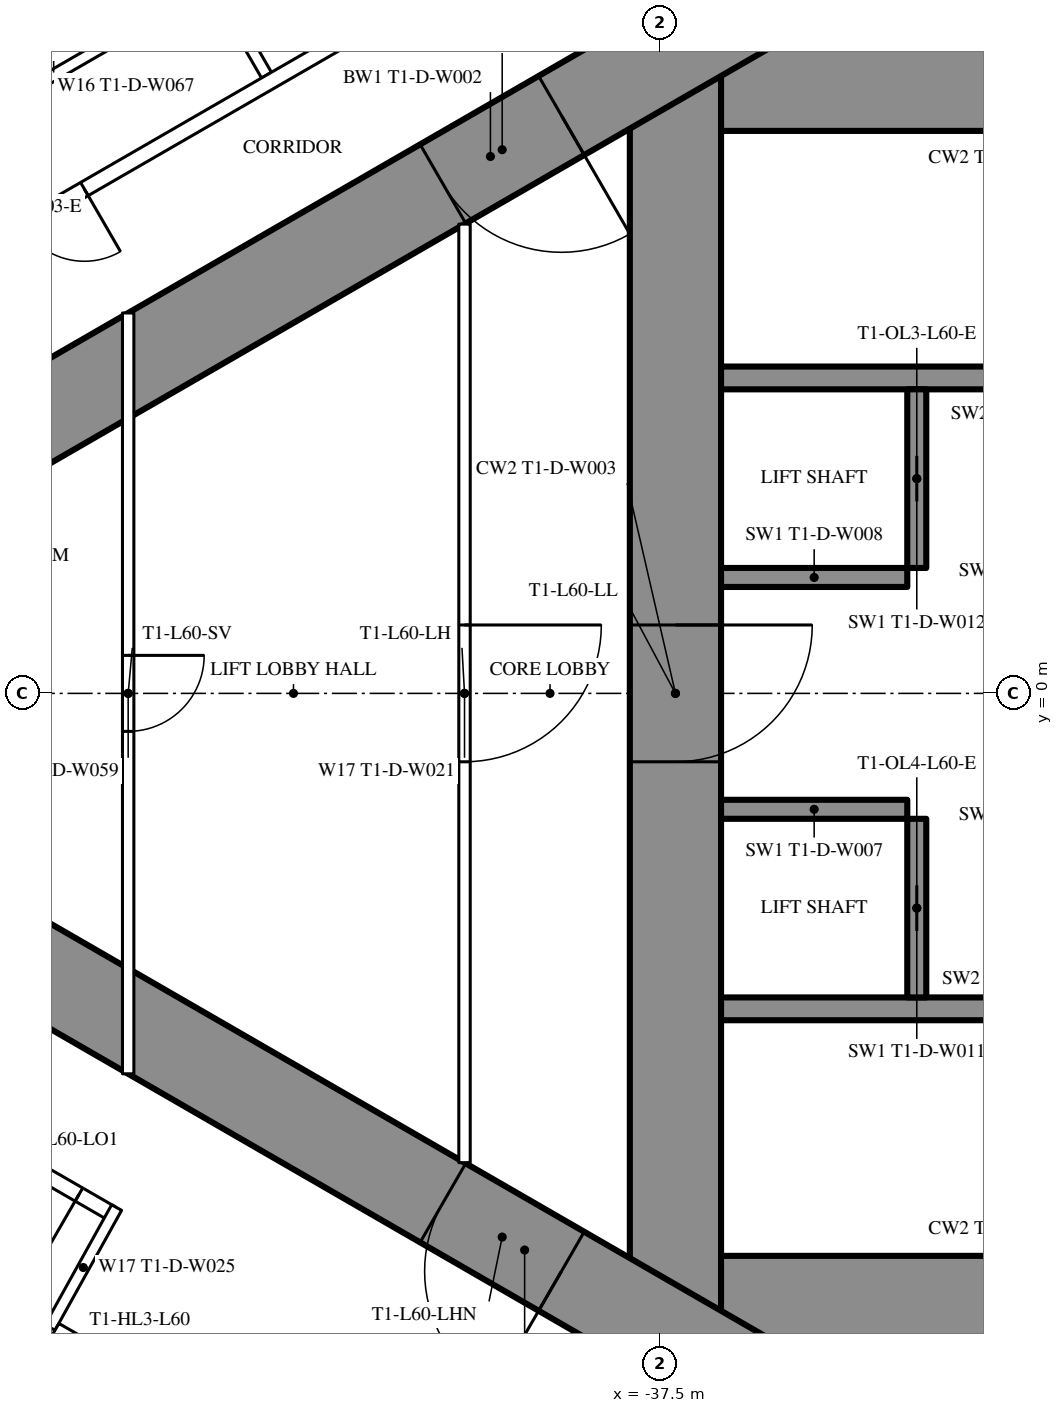
"""IFC4 building model, lengths in metres.
Left out: names, types, materials, properties, quantities, classifications, styles, units other than length and angle.
Written with IfcOpenShell. Run it as: python <this file> out.ifc"""

import sys

from ifc_helpers import new_model, si_unit, direction, frame, frame_2d, origin, place, context, subcontext, project, spatial, rectangle, extrude, element, fill, save


model = new_model("IFC4")
c1 = context("Model", 3, precision=1e-05, world=origin(), true_north=direction((0.0, 1.0)))
c2 = subcontext(c1, "Body", "Model", "MODEL_VIEW")
j1 = project(units=[si_unit("LENGTHUNIT", "METRE"), si_unit("PLANEANGLEUNIT", "RADIAN")], contexts=[c1])
p1 = place(None, origin())
s1 = spatial("IfcSite", under=j1, at=p1, CompositionType="ELEMENT")
p2 = place(p1, origin())
s2 = spatial("IfcBuilding", under=s1, at=p2, CompositionType="ELEMENT")
p3 = place(p2, frame((0.0, 0.0, 226.1)))
s3 = spatial("IfcBuildingStorey", under=s2, at=p3, CompositionType="ELEMENT", Elevation=226.1)
p4 = place(p3, frame((-37.3, 8.6, 0.0), z_axis=(0.0, 0.0, 1.0), x_axis=(0.0, -1.0, 0.0)))
e1 = element("IfcWall", 1, at=p4, inside=s3, PredefinedType="SHEAR", context=c2, shape_type="SweptSolid", body=[
    extrude(rectangle(XDim=17.2, YDim=1.2, at=frame_2d((8.6, 0.0))), origin(), (0.0, 0.0, 1.0), 3.6),
])
p5 = place(p4, frame((7.7, 0.0, 0.0)))
e2 = element("IfcOpeningElement", 2, at=p5, cuts=e1, PredefinedType="OPENING", context=c2, shape_type="SweptSolid", body=[
    extrude(rectangle(XDim=1.8, YDim=2.2, at=frame_2d((0.9, 1.1))), frame((0.0, 0.61, 0.0), z_axis=(0.0, -1.0, 0.0), x_axis=(1.0, 0.0, 0.0)), (0.0, 0.0, 1.0), 1.22),
])
p6 = place(p3, frame((-28.3, 8.0, 0.0), z_axis=(0.0, 0.0, 1.0), x_axis=(-1.0, 0.0, 0.0)))
e3 = element("IfcWall", 3, at=p6, inside=s3, PredefinedType="SHEAR", context=c2, shape_type="SweptSolid", body=[
    extrude(rectangle(XDim=8.4, YDim=1.2, at=frame_2d((4.2, 0.0))), origin(), (0.0, 0.0, 1.0), 3.6),
])
p7 = place(p6, frame((0.25, 0.0, 0.0)))
e4 = element("IfcOpeningElement", 4, at=p7, cuts=e3, PredefinedType="OPENING", context=c2, shape_type="SweptSolid", body=[
    extrude(rectangle(XDim=1.0, YDim=2.2, at=frame_2d((0.5, 1.1))), frame((0.0, 0.61, 0.0), z_axis=(0.0, -1.0, 0.0), x_axis=(1.0, 0.0, 0.0)), (0.0, 0.0, 1.0), 1.22),
])
p8 = place(p3, frame((-28.3, -8.0, 0.0), z_axis=(0.0, 0.0, 1.0), x_axis=(-1.0, 0.0, 0.0)))
e5 = element("IfcWall", 5, at=p8, inside=s3, PredefinedType="SHEAR", context=c2, shape_type="SweptSolid", body=[
    extrude(rectangle(XDim=8.4, YDim=1.2, at=frame_2d((4.2, 0.0))), origin(), (0.0, 0.0, 1.0), 3.6),
])
p9 = place(p8, frame((0.25, 0.0, 0.0)))
e6 = element("IfcOpeningElement", 6, at=p9, cuts=e5, PredefinedType="OPENING", context=c2, shape_type="SweptSolid", body=[
    extrude(rectangle(XDim=1.0, YDim=2.2, at=frame_2d((0.5, 1.1))), frame((0.0, 0.61, 0.0), z_axis=(0.0, -1.0, 0.0), x_axis=(1.0, 0.0, 0.0)), (0.0, 0.0, 1.0), 1.22),
])
for number, where, z_axis, x_axis in (
    (7, (-28.3, 4.15, 0.0), (0.0, 0.0, 1.0), (-1.0, 0.0, 0.0)),
    (8, (-28.3, -4.15, 0.0), (0.0, 0.0, 1.0), (-1.0, 0.0, 0.0)),
):
    element("IfcWall", number, at=place(p3, frame(where, z_axis=z_axis, x_axis=x_axis)), inside=s3, PredefinedType="SHEAR", context=c2, shape_type="SweptSolid", body=[
        extrude(rectangle(XDim=8.4, YDim=0.3, at=frame_2d((4.2, 0.0))), origin(), (0.0, 0.0, 1.0), 3.6),
    ])
p10 = place(p3, frame((-34.125, 4.0, 0.0), z_axis=(0.0, 0.0, 1.0), x_axis=(0.0, -1.0, 0.0)))
e9 = element("IfcWall", 9, at=p10, inside=s3, PredefinedType="SHEAR", context=c2, shape_type="SweptSolid", body=[
    extrude(rectangle(XDim=2.35, YDim=0.25, at=frame_2d((1.175, 0.0))), origin(), (0.0, 0.0, 1.0), 3.6),
])
p11 = place(p10, frame((0.875, 0.0, 0.0)))
e10 = element("IfcOpeningElement", 10, at=p11, cuts=e9, PredefinedType="OPENING", context=c2, shape_type="SweptSolid", body=[
    extrude(rectangle(XDim=0.6, YDim=2.0, at=frame_2d((0.3, 1.0))), frame((0.0, 0.135, 0.0), z_axis=(0.0, -1.0, 0.0), x_axis=(1.0, 0.0, 0.0)), (0.0, 0.0, 1.0), 0.27),
])
p12 = place(p3, frame((-34.25, 1.525, 0.0), z_axis=(0.0, 0.0, 1.0), x_axis=(-1.0, 0.0, 0.0)))
e11 = element("IfcWall", 11, at=p12, inside=s3, PredefinedType="SHEAR", context=c2, shape_type="SweptSolid", body=[
    extrude(rectangle(XDim=2.45, YDim=0.25, at=frame_2d((1.225, 0.0))), origin(), (0.0, 0.0, 1.0), 3.6),
])
p13 = place(p3, frame((-34.125, -1.65, 0.0), z_axis=(0.0, 0.0, 1.0), x_axis=(0.0, -1.0, 0.0)))
e12 = element("IfcWall", 12, at=p13, inside=s3, PredefinedType="SHEAR", context=c2, shape_type="SweptSolid", body=[
    extrude(rectangle(XDim=2.35, YDim=0.25, at=frame_2d((1.175, 0.0))), origin(), (0.0, 0.0, 1.0), 3.6),
])
p14 = place(p13, frame((0.875, 0.0, 0.0)))
e13 = element("IfcOpeningElement", 13, at=p14, cuts=e12, PredefinedType="OPENING", context=c2, shape_type="SweptSolid", body=[
    extrude(rectangle(XDim=0.6, YDim=2.0, at=frame_2d((0.3, 1.0))), frame((0.0, 0.135, 0.0), z_axis=(0.0, -1.0, 0.0), x_axis=(1.0, 0.0, 0.0)), (0.0, 0.0, 1.0), 0.27),
])
p15 = place(p3, frame((-34.25, -1.525, 0.0), z_axis=(0.0, 0.0, 1.0), x_axis=(-1.0, 0.0, 0.0)))
e14 = element("IfcWall", 14, at=p15, inside=s3, PredefinedType="SHEAR", context=c2, shape_type="SweptSolid", body=[
    extrude(rectangle(XDim=2.45, YDim=0.25, at=frame_2d((1.225, 0.0))), origin(), (0.0, 0.0, 1.0), 3.6),
])
p16 = place(p3, frame((-27.2, 14.3, 0.0), z_axis=(0.0, 0.0, 1.0), x_axis=(-0.866026593062, -0.499997940104, 0.0)))
e15 = element("IfcWall", 15, at=p16, inside=s3, PredefinedType="SHEAR", context=c2, shape_type="SweptSolid", body=[
    extrude(rectangle(XDim=28.946, YDim=1.2, at=frame_2d((14.473, 0.0))), origin(), (0.0, 0.0, 1.0), 3.6),
])
p17 = place(p16, frame((4.6, 0.0, 0.0)))
e16 = element("IfcOpeningElement", 16, at=p17, cuts=e15, PredefinedType="OPENING", context=c2, shape_type="SweptSolid", body=[
    extrude(rectangle(XDim=1.0, YDim=2.2, at=frame_2d((0.5, 1.1))), frame((0.0, 0.61, 0.0), z_axis=(0.0, -1.0, 0.0), x_axis=(1.0, 0.0, 0.0)), (0.0, 0.0, 1.0), 1.22),
])
p18 = place(p16, frame((13.395, 0.0, 0.0)))
e17 = element("IfcOpeningElement", 17, at=p18, cuts=e15, PredefinedType="OPENING", context=c2, shape_type="SweptSolid", body=[
    extrude(rectangle(XDim=1.8, YDim=2.2, at=frame_2d((0.9, 1.1))), frame((0.0, 0.61, 0.0), z_axis=(0.0, -1.0, 0.0), x_axis=(1.0, 0.0, 0.0)), (0.0, 0.0, 1.0), 1.22),
])
p19 = place(p3, frame((-27.2, -14.3, 0.0), z_axis=(0.0, 0.0, 1.0), x_axis=(-0.866024021859, 0.500002393557, 0.0)))
e18 = element("IfcWall", 18, at=p19, inside=s3, PredefinedType="SHEAR", context=c2, shape_type="SweptSolid", body=[
    extrude(rectangle(XDim=27.907, YDim=1.2, at=frame_2d((13.954, 0.0))), origin(), (0.0, 0.0, 1.0), 3.6),
])
p20 = place(p19, frame((4.6, 0.0, 0.0)))
e19 = element("IfcOpeningElement", 19, at=p20, cuts=e18, PredefinedType="OPENING", context=c2, shape_type="SweptSolid", body=[
    extrude(rectangle(XDim=1.0, YDim=2.2, at=frame_2d((0.5, 1.1))), frame((0.0, 0.61, 0.0), z_axis=(0.0, -1.0, 0.0), x_axis=(1.0, 0.0, 0.0)), (0.0, 0.0, 1.0), 1.22),
])
p21 = place(p19, frame((13.395, 0.0, 0.0)))
e20 = element("IfcOpeningElement", 20, at=p21, cuts=e18, PredefinedType="OPENING", context=c2, shape_type="SweptSolid", body=[
    extrude(rectangle(XDim=1.8, YDim=2.2, at=frame_2d((0.9, 1.1))), frame((0.0, 0.61, 0.0), z_axis=(0.0, -1.0, 0.0), x_axis=(1.0, 0.0, 0.0)), (0.0, 0.0, 1.0), 1.22),
])
p22 = place(p3, frame((-42.68, 8.134, 0.0), z_axis=(0.0, 0.0, 1.0), x_axis=(-0.499984479505, 0.866034364361, 0.0)))
e21 = element("IfcWall", 21, at=p22, inside=s3, PredefinedType="PARTITIONING", context=c2, shape_type="SweptSolid", body=[
    extrude(rectangle(XDim=5.995, YDim=0.15, at=frame_2d((2.998, 0.0))), origin(), (0.0, 0.0, 1.0), 2.45),
])
p23 = place(p3, frame((-44.715, -6.844, 0.0), z_axis=(0.0, 0.0, 1.0), x_axis=(-0.866025261224, 0.500000246922, 0.0)))
e22 = element("IfcWall", 22, at=p23, inside=s3, PredefinedType="PARTITIONING", context=c2, shape_type="SweptSolid", body=[
    extrude(rectangle(XDim=13.567, YDim=0.2, at=frame_2d((6.783, 0.0))), origin(), (0.0, 0.0, 1.0), 3.35),
])
p24 = place(p23, frame((6.266, 0.0, 0.0)))
e23 = element("IfcOpeningElement", 23, at=p24, cuts=e22, PredefinedType="OPENING", context=c2, shape_type="SweptSolid", body=[
    extrude(rectangle(XDim=0.95, YDim=2.2, at=frame_2d((0.475, 1.1))), frame((0.0, 0.11, 0.0), z_axis=(0.0, -1.0, 0.0), x_axis=(1.0, 0.0, 0.0)), (0.0, 0.0, 1.0), 0.22),
])
p25 = place(p23, frame((4.565, 0.0, 0.0)))
e24 = element("IfcOpeningElement", 24, at=p25, cuts=e22, PredefinedType="OPENING", context=c2, shape_type="SweptSolid", body=[
    extrude(rectangle(XDim=0.95, YDim=2.2, at=frame_2d((0.475, 1.1))), frame((0.0, 0.11, 0.0), z_axis=(0.0, -1.0, 0.0), x_axis=(1.0, 0.0, 0.0)), (0.0, 0.0, 1.0), 0.22),
])
p26 = place(p23, frame((0.5, 0.0, 0.0)))
e25 = element("IfcOpeningElement", 25, at=p26, cuts=e22, PredefinedType="OPENING", context=c2, shape_type="SweptSolid", body=[
    extrude(rectangle(XDim=0.967, YDim=2.2, at=frame_2d((0.483, 1.1))), frame((0.0, 0.11, 0.0), z_axis=(0.0, -1.0, 0.0), x_axis=(1.0, 0.0, 0.0)), (0.0, 0.0, 1.0), 0.22),
])
p27 = place(p3, frame((-44.652, -6.764, 0.0), z_axis=(0.0, 0.0, 1.0), x_axis=(-0.485424724123, -0.874278466629, 0.0)))
e26 = element("IfcWall", 26, at=p27, inside=s3, PredefinedType="PARTITIONING", context=c2, shape_type="SweptSolid", body=[
    extrude(rectangle(XDim=1.805, YDim=0.15, at=frame_2d((0.903, 0.0))), origin(), (0.0, 0.0, 1.0), 3.35),
])
p28 = place(p3, frame((-44.765, 8.546, 0.0), z_axis=(0.0, 0.0, 1.0), x_axis=(-0.86604923931, -0.499958713387, 0.0)))
e27 = element("IfcWall", 27, at=p28, inside=s3, PredefinedType="PARTITIONING", context=c2, shape_type="SweptSolid", body=[
    extrude(rectangle(XDim=2.475, YDim=0.15, at=frame_2d((1.237, 0.0))), origin(), (0.0, 0.0, 1.0), 3.35),
])
p29 = place(p3, frame((-28.737, 16.068, 0.0), z_axis=(0.0, 0.0, 1.0), x_axis=(-0.866023901326, -0.500002602325, 0.0)))
e28 = element("IfcWall", 28, at=p29, inside=s3, PredefinedType="PARTITIONING", context=c2, shape_type="SweptSolid", body=[
    extrude(rectangle(XDim=20.192, YDim=0.2, at=frame_2d((10.096, 0.0))), origin(), (0.0, 0.0, 1.0), 3.35),
])
p30 = place(p29, frame((1.08, 0.0, 0.0)))
e29 = element("IfcOpeningElement", 29, at=p30, cuts=e28, PredefinedType="OPENING", context=c2, shape_type="SweptSolid", body=[
    extrude(rectangle(XDim=1.8, YDim=2.04, at=frame_2d((0.9, 1.02))), frame((0.0, 0.11, 0.0), z_axis=(0.0, -1.0, 0.0), x_axis=(1.0, 0.0, 0.0)), (0.0, 0.0, 1.0), 0.22),
])
p31 = place(p29, frame((6.86, 0.0, 0.0)))
e30 = element("IfcOpeningElement", 30, at=p31, cuts=e28, PredefinedType="OPENING", context=c2, shape_type="SweptSolid", body=[
    extrude(rectangle(XDim=1.0, YDim=2.2, at=frame_2d((0.5, 1.1))), frame((0.0, 0.11, 0.0), z_axis=(0.0, -1.0, 0.0), x_axis=(1.0, 0.0, 0.0)), (0.0, 0.0, 1.0), 0.22),
])
p32 = place(p29, frame((18.867, 0.0, 0.0)))
e31 = element("IfcOpeningElement", 31, at=p32, cuts=e28, PredefinedType="OPENING", context=c2, shape_type="SweptSolid", body=[
    extrude(rectangle(XDim=0.95, YDim=2.2, at=frame_2d((0.475, 1.1))), frame((0.0, 0.11, 0.0), z_axis=(0.0, -1.0, 0.0), x_axis=(1.0, 0.0, 0.0)), (0.0, 0.0, 1.0), 0.22),
])
p33 = place(p3, frame((-40.075, 6.174, 0.0), z_axis=(0.0, 0.0, 1.0), x_axis=(0.0, -1.0, 0.0)))
e32 = element("IfcWall", 32, at=p33, inside=s3, PredefinedType="PARTITIONING", context=c2, shape_type="SweptSolid", body=[
    extrude(rectangle(XDim=12.348, YDim=0.15, at=frame_2d((6.174, 0.0))), origin(), (0.0, 0.0, 1.0), 3.35),
])
p34 = place(p33, frame((5.274, 0.0, 0.0)))
e33 = element("IfcOpeningElement", 33, at=p34, cuts=e32, PredefinedType="OPENING", context=c2, shape_type="SweptSolid", body=[
    extrude(rectangle(XDim=1.8, YDim=2.2, at=frame_2d((0.9, 1.1))), frame((0.0, 0.085, 0.0), z_axis=(0.0, -1.0, 0.0), x_axis=(1.0, 0.0, 0.0)), (0.0, 0.0, 1.0), 0.17),
])
p35 = place(p3, frame((-44.5, 5.005, 0.0), z_axis=(0.0, 0.0, 1.0), x_axis=(0.0, -1.0, 0.0)))
e34 = element("IfcWall", 34, at=p35, inside=s3, PredefinedType="PARTITIONING", context=c2, shape_type="SweptSolid", body=[
    extrude(rectangle(XDim=10.009, YDim=0.15, at=frame_2d((5.005, 0.0))), origin(), (0.0, 0.0, 1.0), 2.5),
])
p36 = place(p35, frame((4.505, 0.0, 0.0)))
e35 = element("IfcOpeningElement", 35, at=p36, cuts=e34, PredefinedType="OPENING", context=c2, shape_type="SweptSolid", body=[
    extrude(rectangle(XDim=1.0, YDim=2.2, at=frame_2d((0.5, 1.1))), frame((0.0, 0.085, 0.0), z_axis=(0.0, -1.0, 0.0), x_axis=(1.0, 0.0, 0.0)), (0.0, 0.0, 1.0), 0.17),
])
p37 = place(p3, frame((-39.758, -11.697, 0.0), z_axis=(0.0, 0.0, 1.0), x_axis=(-0.866024194504, 0.500002094529, 0.0)))
e36 = element("IfcWall", 36, at=p37, inside=s3, PredefinedType="PARTITIONING", context=c2, shape_type="SweptSolid", body=[
    extrude(rectangle(XDim=6.6, YDim=0.25, at=frame_2d((3.3, 0.0))), origin(), (0.0, 0.0, 1.0), 3.35),
])
p38 = place(p37, frame((0.75, 0.0, 0.0)))
e37 = element("IfcOpeningElement", 37, at=p38, cuts=e36, PredefinedType="OPENING", context=c2, shape_type="SweptSolid", body=[
    extrude(rectangle(XDim=1.1, YDim=2.2, at=frame_2d((0.55, 1.1))), frame((0.0, 0.135, 0.0), z_axis=(0.0, -1.0, 0.0), x_axis=(1.0, 0.0, 0.0)), (0.0, 0.0, 1.0), 0.27),
])
p39 = place(p37, frame((2.75, 0.0, 0.0)))
e38 = element("IfcOpeningElement", 38, at=p39, cuts=e36, PredefinedType="OPENING", context=c2, shape_type="SweptSolid", body=[
    extrude(rectangle(XDim=1.1, YDim=2.2, at=frame_2d((0.55, 1.1))), frame((0.0, 0.135, 0.0), z_axis=(0.0, -1.0, 0.0), x_axis=(1.0, 0.0, 0.0)), (0.0, 0.0, 1.0), 0.27),
])
p40 = place(p37, frame((4.75, 0.0, 0.0)))
e39 = element("IfcOpeningElement", 39, at=p40, cuts=e36, PredefinedType="OPENING", context=c2, shape_type="SweptSolid", body=[
    extrude(rectangle(XDim=1.1, YDim=2.2, at=frame_2d((0.55, 1.1))), frame((0.0, 0.135, 0.0), z_axis=(0.0, -1.0, 0.0), x_axis=(1.0, 0.0, 0.0)), (0.0, 0.0, 1.0), 0.27),
])
p41 = place(p32, origin())
e40 = element("IfcDoor", 40, at=p41, inside=s3, OperationType="SINGLE_SWING_LEFT", PredefinedType="DOOR", context=c2, shape_type="SweptSolid", body=[
    extrude(rectangle(XDim=0.95, YDim=2.2, at=frame_2d((0.475, 1.1))), frame((0.0, 0.025, 0.0), z_axis=(0.0, -1.0, 0.0), x_axis=(1.0, 0.0, 0.0)), (0.0, 0.0, 1.0), 0.05),
])
fill(e31, e40)
p42 = place(p26, origin())
e41 = element("IfcDoor", 41, at=p42, inside=s3, OperationType="SINGLE_SWING_LEFT", PredefinedType="DOOR", context=c2, shape_type="SweptSolid", body=[
    extrude(rectangle(XDim=0.967, YDim=2.2, at=frame_2d((0.483, 1.1))), frame((0.0, 0.025, 0.0), z_axis=(0.0, -1.0, 0.0), x_axis=(1.0, 0.0, 0.0)), (0.0, 0.0, 1.0), 0.05),
])
fill(e25, e41)
p43 = place(p34, origin())
e42 = element("IfcDoor", 42, at=p43, inside=s3, OperationType="DOUBLE_DOOR_SINGLE_SWING", PredefinedType="DOOR", context=c2, shape_type="SweptSolid", body=[
    extrude(rectangle(XDim=1.8, YDim=2.2, at=frame_2d((0.9, 1.1))), frame((0.0, 0.025, 0.0), z_axis=(0.0, -1.0, 0.0), x_axis=(1.0, 0.0, 0.0)), (0.0, 0.0, 1.0), 0.05),
])
fill(e33, e42)
p44 = place(p36, origin())
e43 = element("IfcDoor", 43, at=p44, inside=s3, OperationType="SINGLE_SWING_LEFT", PredefinedType="DOOR", context=c2, shape_type="SweptSolid", body=[
    extrude(rectangle(XDim=1.0, YDim=2.2, at=frame_2d((0.5, 1.1))), frame((0.0, 0.025, 0.0), z_axis=(0.0, -1.0, 0.0), x_axis=(1.0, 0.0, 0.0)), (0.0, 0.0, 1.0), 0.05),
])
fill(e35, e43)
p45 = place(p18, origin())
e44 = element("IfcDoor", 44, at=p45, inside=s3, OperationType="DOUBLE_DOOR_SINGLE_SWING", PredefinedType="DOOR", context=c2, shape_type="SweptSolid", body=[
    extrude(rectangle(XDim=1.8, YDim=2.2, at=frame_2d((0.9, 1.1))), frame((0.0, 0.025, 0.0), z_axis=(0.0, -1.0, 0.0), x_axis=(1.0, 0.0, 0.0)), (0.0, 0.0, 1.0), 0.05),
])
fill(e17, e44)
p46 = place(p21, origin())
e45 = element("IfcDoor", 45, at=p46, inside=s3, OperationType="DOUBLE_DOOR_SINGLE_SWING", PredefinedType="DOOR", context=c2, shape_type="SweptSolid", body=[
    extrude(rectangle(XDim=1.8, YDim=2.2, at=frame_2d((0.9, 1.1))), frame((0.0, 0.025, 0.0), z_axis=(0.0, -1.0, 0.0), x_axis=(1.0, 0.0, 0.0)), (0.0, 0.0, 1.0), 0.05),
])
fill(e20, e45)
p47 = place(p5, origin())
e46 = element("IfcDoor", 46, at=p47, inside=s3, OperationType="DOUBLE_DOOR_SINGLE_SWING", PredefinedType="DOOR", context=c2, shape_type="SweptSolid", body=[
    extrude(rectangle(XDim=1.8, YDim=2.2, at=frame_2d((0.9, 1.1))), frame((0.0, 0.025, 0.0), z_axis=(0.0, -1.0, 0.0), x_axis=(1.0, 0.0, 0.0)), (0.0, 0.0, 1.0), 0.05),
])
fill(e2, e46)
p48 = place(p11, origin())
e47 = element("IfcDoor", 47, at=p48, inside=s3, OperationType="SLIDING_TO_LEFT", PredefinedType="DOOR", context=c2, shape_type="SweptSolid", body=[
    extrude(rectangle(XDim=0.6, YDim=2.0, at=frame_2d((0.3, 1.0))), frame((0.0, 0.025, 0.0), z_axis=(0.0, -1.0, 0.0), x_axis=(1.0, 0.0, 0.0)), (0.0, 0.0, 1.0), 0.05),
])
fill(e10, e47)
p49 = place(p14, origin())
e48 = element("IfcDoor", 48, at=p49, inside=s3, OperationType="SLIDING_TO_LEFT", PredefinedType="DOOR", context=c2, shape_type="SweptSolid", body=[
    extrude(rectangle(XDim=0.6, YDim=2.0, at=frame_2d((0.3, 1.0))), frame((0.0, 0.025, 0.0), z_axis=(0.0, -1.0, 0.0), x_axis=(1.0, 0.0, 0.0)), (0.0, 0.0, 1.0), 0.05),
])
fill(e13, e48)
save(model, sys.argv[1])
